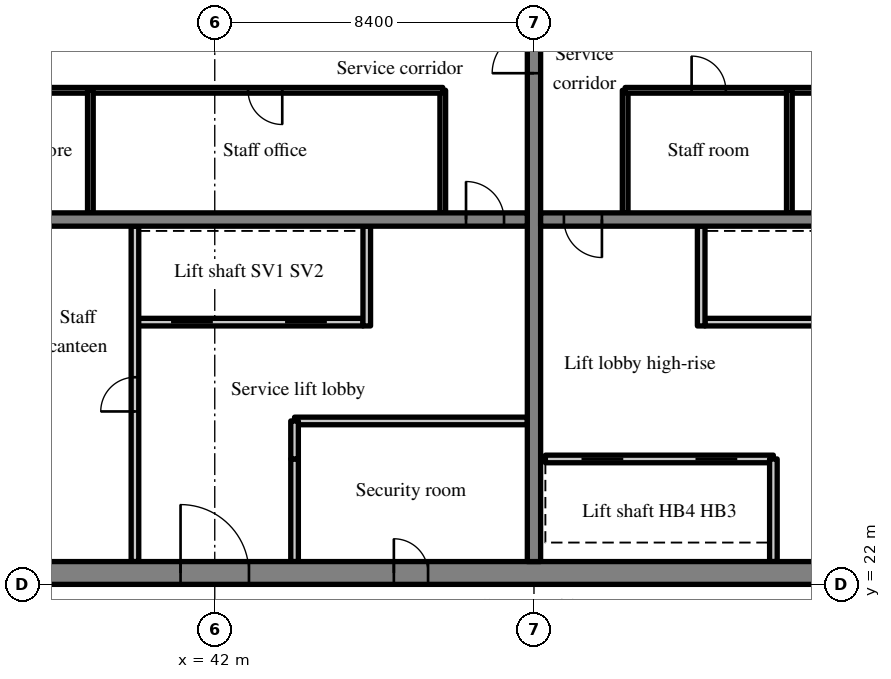
"""IFC4 building model, lengths in metres.
Left out: names, types, materials, properties, quantities, classifications, styles, units other than length and angle.
Written with IfcOpenShell. Run it as: python <this file> out.ifc"""

import sys

from ifc_helpers import new_model, si_unit, direction, frame, frame_2d, origin, place, context, subcontext, project, spatial, rectangle, extrude, source, transform, mapped, element, fill, save


model = new_model("IFC4")
c1 = context("Model", 3, precision=1e-05, world=origin(), true_north=direction((0.0, 1.0)))
c2 = subcontext(c1, "Body", "Model", "MODEL_VIEW")
j1 = project(units=[si_unit("LENGTHUNIT", "METRE"), si_unit("PLANEANGLEUNIT", "RADIAN")], contexts=[c1])
p1 = place(None, origin())
s1 = spatial("IfcSite", under=j1, at=p1, CompositionType="ELEMENT")
p2 = place(p1, origin())
s2 = spatial("IfcBuilding", under=s1, at=p2, CompositionType="ELEMENT")
p3 = place(p2, frame((0.0, 0.0, 217.9)))
s3 = spatial("IfcBuildingStorey", under=s2, at=p3, CompositionType="ELEMENT", Elevation=217.9)
m1 = source(origin(), c2, "Body", "SweptSolid", [
    extrude(rectangle(XDim=50.4, YDim=0.6, at=frame_2d((25.2, 0.0))), origin(), (0.0, 0.0, 1.0), 3.62),
])
p4 = place(p3, frame((25.2, 22.3, 0.0), z_axis=(0.0, 0.0, 1.0), x_axis=(1.0, 0.0, 0.0)))
e1 = element("IfcWall", 1, at=p4, inside=s3, PredefinedType="SHEAR", context=c2, shape_type="MappedRepresentation", body=[
    mapped(m1, transform((0.0, 0.0, 0.0), scale=1.0)),
])
m2 = source(origin(), c2, "Body", "SweptSolid", [
    extrude(rectangle(XDim=1.8, YDim=2.1, at=frame_2d((0.9, 1.05))), frame((0.0, 0.31, 0.0), z_axis=(0.0, -1.0, 0.0), x_axis=(1.0, 0.0, 0.0)), (0.0, 0.0, 1.0), 0.62),
])
p5 = place(p4, frame((15.9, 0.0, 0.0)))
e2 = element("IfcOpeningElement", 2, at=p5, cuts=e1, PredefinedType="OPENING", context=c2, shape_type="MappedRepresentation", body=[
    mapped(m2, transform((0.0, 0.0, 0.0), scale=1.0)),
])
m3 = source(origin(), c2, "Body", "SweptSolid", [
    extrude(rectangle(XDim=0.9, YDim=2.1, at=frame_2d((0.45, 1.05))), frame((0.0, 0.31, 0.0), z_axis=(0.0, -1.0, 0.0), x_axis=(1.0, 0.0, 0.0)), (0.0, 0.0, 1.0), 0.62),
])
p6 = place(p4, frame((9.687, 0.0, 0.0)))
e3 = element("IfcOpeningElement", 3, at=p6, cuts=e1, PredefinedType="OPENING", context=c2, shape_type="MappedRepresentation", body=[
    mapped(m3, transform((0.0, 0.0, 0.0), scale=1.0)),
])
p7 = place(p4, frame((21.513, 0.0, 0.0)))
e4 = element("IfcOpeningElement", 4, at=p7, cuts=e1, PredefinedType="OPENING", context=c2, shape_type="MappedRepresentation", body=[
    mapped(m3, transform((0.0, 0.0, 0.0), scale=1.0)),
])
p8 = place(p4, frame((32.7, 0.0, 0.0)))
e5 = element("IfcOpeningElement", 5, at=p8, cuts=e1, PredefinedType="OPENING", context=c2, shape_type="MappedRepresentation", body=[
    mapped(m2, transform((0.0, 0.0, 0.0), scale=1.0)),
])
m4 = source(origin(), c2, "Body", "SweptSolid", [
    extrude(rectangle(XDim=1.2, YDim=2.1, at=frame_2d((0.6, 1.05))), frame((0.0, 0.31, 0.0), z_axis=(0.0, -1.0, 0.0), x_axis=(1.0, 0.0, 0.0)), (0.0, 0.0, 1.0), 0.62),
])
p9 = place(p4, frame((6.488, 0.0, 0.0)))
e6 = element("IfcOpeningElement", 6, at=p9, cuts=e1, PredefinedType="OPENING", context=c2, shape_type="MappedRepresentation", body=[
    mapped(m4, transform((0.0, 0.0, 0.0), scale=1.0)),
])
p10 = place(p4, frame((47.925, 0.0, 0.0)))
e7 = element("IfcOpeningElement", 7, at=p10, cuts=e1, PredefinedType="OPENING", context=c2, shape_type="MappedRepresentation", body=[
    mapped(m4, transform((0.0, 0.0, 0.0), scale=1.0)),
])
m5 = source(origin(), c2, "Body", "SweptSolid", [
    extrude(rectangle(XDim=18.8, YDim=0.35, at=frame_2d((9.4, 0.0))), origin(), (0.0, 0.0, 1.0), 3.62),
])
p11 = place(p3, frame((50.4, 22.6, 0.0), z_axis=(0.0, 0.0, 1.0), x_axis=(0.0, 1.0, 0.0)))
e8 = element("IfcWall", 8, at=p11, inside=s3, PredefinedType="SHEAR", context=c2, shape_type="MappedRepresentation", body=[
    mapped(m5, transform((0.0, 0.0, 0.0), scale=1.0)),
])
m6 = source(origin(), c2, "Body", "SweptSolid", [
    extrude(rectangle(XDim=1.1, YDim=2.1, at=frame_2d((0.55, 1.05))), frame((0.0, 0.185, 0.0), z_axis=(0.0, -1.0, 0.0), x_axis=(1.0, 0.0, 0.0)), (0.0, 0.0, 1.0), 0.37),
])
p12 = place(p11, frame((12.85, 0.0, 0.0)))
e9 = element("IfcOpeningElement", 9, at=p12, cuts=e8, PredefinedType="OPENING", context=c2, shape_type="MappedRepresentation", body=[
    mapped(m6, transform((0.0, 0.0, 0.0), scale=1.0)),
])
m7 = source(origin(), c2, "Body", "SweptSolid", [
    extrude(rectangle(XDim=16.45, YDim=0.35, at=frame_2d((8.225, 0.0))), origin(), (0.0, 0.0, 1.0), 3.62),
])
p13 = place(p3, frame((33.775, 31.6, 0.0), z_axis=(0.0, 0.0, 1.0), x_axis=(1.0, 0.0, 0.0)))
e10 = element("IfcWall", 10, at=p13, inside=s3, PredefinedType="SHEAR", context=c2, shape_type="MappedRepresentation", body=[
    mapped(m7, transform((0.0, 0.0, 0.0), scale=1.0)),
])
m8 = source(origin(), c2, "Body", "SweptSolid", [
    extrude(rectangle(XDim=1.0, YDim=2.1, at=frame_2d((0.5, 1.05))), frame((0.0, 0.185, 0.0), z_axis=(0.0, -1.0, 0.0), x_axis=(1.0, 0.0, 0.0)), (0.0, 0.0, 1.0), 0.37),
])
p14 = place(p13, frame((14.837, 0.0, 0.0)))
e11 = element("IfcOpeningElement", 11, at=p14, cuts=e10, PredefinedType="OPENING", context=c2, shape_type="MappedRepresentation", body=[
    mapped(m8, transform((0.0, 0.0, 0.0), scale=1.0)),
])
m9 = source(origin(), c2, "Body", "SweptSolid", [
    extrude(rectangle(XDim=16.45, YDim=0.35, at=frame_2d((8.225, 0.0))), origin(), (0.0, 0.0, 1.0), 3.62),
])
p15 = place(p3, frame((50.575, 31.6, 0.0), z_axis=(0.0, 0.0, 1.0), x_axis=(1.0, 0.0, 0.0)))
e12 = element("IfcWall", 12, at=p15, inside=s3, PredefinedType="SHEAR", context=c2, shape_type="MappedRepresentation", body=[
    mapped(m9, transform((0.0, 0.0, 0.0), scale=1.0)),
])
p16 = place(p15, frame((0.613, 0.0, 0.0)))
e13 = element("IfcOpeningElement", 13, at=p16, cuts=e12, PredefinedType="OPENING", context=c2, shape_type="MappedRepresentation", body=[
    mapped(m8, transform((0.0, 0.0, 0.0), scale=1.0)),
])
m10 = source(origin(), c2, "Body", "SweptSolid", [
    extrude(rectangle(XDim=6.0, YDim=0.2, at=frame_2d((3.0, 0.0))), origin(), (0.0, 0.0, 1.0), 3.62),
])
p17 = place(p3, frame((39.9, 28.9, 0.0), z_axis=(0.0, 0.0, 1.0), x_axis=(1.0, 0.0, 0.0)))
e14 = element("IfcWall", 14, at=p17, inside=s3, PredefinedType="SOLIDWALL", context=c2, shape_type="MappedRepresentation", body=[
    mapped(m10, transform((0.0, 0.0, 0.0), scale=1.0)),
])
m11 = source(origin(), c2, "Body", "SweptSolid", [
    extrude(rectangle(XDim=1.1, YDim=2.1, at=frame_2d((0.55, 1.05))), frame((0.0, 0.11, 0.0), z_axis=(0.0, -1.0, 0.0), x_axis=(1.0, 0.0, 0.0)), (0.0, 0.0, 1.0), 0.22),
])
p18 = place(p17, frame((0.95, 0.0, 0.0)))
e15 = element("IfcOpeningElement", 15, at=p18, cuts=e14, PredefinedType="OPENING", context=c2, shape_type="MappedRepresentation", body=[
    mapped(m11, transform((0.0, 0.0, 0.0), scale=1.0)),
])
p19 = place(p17, frame((3.95, 0.0, 0.0)))
e16 = element("IfcOpeningElement", 16, at=p19, cuts=e14, PredefinedType="OPENING", context=c2, shape_type="MappedRepresentation", body=[
    mapped(m11, transform((0.0, 0.0, 0.0), scale=1.0)),
])
m12 = source(origin(), c2, "Body", "SweptSolid", [
    extrude(rectangle(XDim=8.825, YDim=0.2, at=frame_2d((4.413, 0.0))), origin(), (0.0, 0.0, 1.0), 3.62),
])
p20 = place(p3, frame((39.9, 22.6, 0.0), z_axis=(0.0, 0.0, 1.0), x_axis=(0.0, 1.0, 0.0)))
e17 = element("IfcWall", 17, at=p20, inside=s3, PredefinedType="PARTITIONING", context=c2, shape_type="MappedRepresentation", body=[
    mapped(m12, transform((0.0, 0.0, 0.0), scale=1.0)),
])
m13 = source(origin(), c2, "Body", "SweptSolid", [
    extrude(rectangle(XDim=0.9, YDim=2.1, at=frame_2d((0.45, 1.05))), frame((0.0, 0.11, 0.0), z_axis=(0.0, -1.0, 0.0), x_axis=(1.0, 0.0, 0.0)), (0.0, 0.0, 1.0), 0.22),
])
p21 = place(p20, frame((3.95, 0.0, 0.0)))
e18 = element("IfcOpeningElement", 18, at=p21, cuts=e17, PredefinedType="OPENING", context=c2, shape_type="MappedRepresentation", body=[
    mapped(m13, transform((0.0, 0.0, 0.0), scale=1.0)),
])
m14 = source(origin(), c2, "Body", "SweptSolid", [
    extrude(rectangle(XDim=2.7, YDim=0.2, at=frame_2d((1.35, 0.0))), origin(), (0.0, 0.0, 1.0), 3.62),
])
p22 = place(p3, frame((44.1, 22.6, 0.0), z_axis=(0.0, 0.0, 1.0), x_axis=(0.0, 1.0, 0.0)))
e19 = element("IfcWall", 19, at=p22, inside=s3, PredefinedType="PARTITIONING", context=c2, shape_type="MappedRepresentation", body=[
    mapped(m14, transform((0.0, 0.0, 0.0), scale=1.0)),
])
m15 = source(origin(), c2, "Body", "SweptSolid", [
    extrude(rectangle(XDim=2.625, YDim=0.2, at=frame_2d((1.312, 0.0))), origin(), (0.0, 0.0, 1.0), 3.62),
])
p23 = place(p3, frame((46.0, 28.8, 0.0), z_axis=(0.0, 0.0, 1.0), x_axis=(0.0, 1.0, 0.0)))
e20 = element("IfcWall", 20, at=p23, inside=s3, PredefinedType="SOLIDWALL", context=c2, shape_type="MappedRepresentation", body=[
    mapped(m15, transform((0.0, 0.0, 0.0), scale=1.0)),
])
m16 = source(origin(), c2, "Body", "SweptSolid", [
    extrude(rectangle(XDim=6.125, YDim=0.2, at=frame_2d((3.062, 0.0))), origin(), (0.0, 0.0, 1.0), 3.62),
])
p24 = place(p3, frame((44.1, 26.3, 0.0), z_axis=(0.0, 0.0, 1.0), x_axis=(1.0, 0.0, 0.0)))
e21 = element("IfcWall", 21, at=p24, inside=s3, PredefinedType="PARTITIONING", context=c2, shape_type="MappedRepresentation", body=[
    mapped(m16, transform((0.0, 0.0, 0.0), scale=1.0)),
])
m17 = source(origin(), c2, "Body", "SweptSolid", [
    extrude(rectangle(XDim=1.0, YDim=0.2, at=frame_2d((0.5, 0.0))), origin(), (0.0, 0.0, 1.0), 3.62),
])
p25 = place(p3, frame((44.1, 25.3, 0.0), z_axis=(0.0, 0.0, 1.0), x_axis=(0.0, 1.0, 0.0)))
e22 = element("IfcWall", 22, at=p25, inside=s3, PredefinedType="PARTITIONING", context=c2, shape_type="MappedRepresentation", body=[
    mapped(m17, transform((0.0, 0.0, 0.0), scale=1.0)),
])
m18 = source(origin(), c2, "Body", "SweptSolid", [
    extrude(rectangle(XDim=3.225, YDim=0.15, at=frame_2d((1.613, 0.0))), origin(), (0.0, 0.0, 1.0), 3.62),
])
p26 = place(p3, frame((48.0, 31.775, 0.0), z_axis=(0.0, 0.0, 1.0), x_axis=(0.0, 1.0, 0.0)))
e23 = element("IfcWall", 23, at=p26, inside=s3, PredefinedType="PARTITIONING", context=c2, shape_type="MappedRepresentation", body=[
    mapped(m18, transform((0.0, 0.0, 0.0), scale=1.0)),
])
m19 = source(origin(), c2, "Body", "SweptSolid", [
    extrude(rectangle(XDim=14.225, YDim=0.15, at=frame_2d((7.113, 0.0))), origin(), (0.0, 0.0, 1.0), 3.62),
])
p27 = place(p3, frame((33.775, 35.0, 0.0), z_axis=(0.0, 0.0, 1.0), x_axis=(1.0, 0.0, 0.0)))
e24 = element("IfcWall", 24, at=p27, inside=s3, PredefinedType="PARTITIONING", context=c2, shape_type="MappedRepresentation", body=[
    mapped(m19, transform((0.0, 0.0, 0.0), scale=1.0)),
])
m20 = source(origin(), c2, "Body", "SweptSolid", [
    extrude(rectangle(XDim=0.9, YDim=2.1, at=frame_2d((0.45, 1.05))), frame((0.0, 0.085, 0.0), z_axis=(0.0, -1.0, 0.0), x_axis=(1.0, 0.0, 0.0)), (0.0, 0.0, 1.0), 0.17),
])
p28 = place(p27, frame((2.026, 0.0, 0.0)))
e25 = element("IfcOpeningElement", 25, at=p28, cuts=e24, PredefinedType="OPENING", context=c2, shape_type="MappedRepresentation", body=[
    mapped(m20, transform((0.0, 0.0, 0.0), scale=1.0)),
])
p29 = place(p27, frame((9.101, 0.0, 0.0)))
e26 = element("IfcOpeningElement", 26, at=p29, cuts=e24, PredefinedType="OPENING", context=c2, shape_type="MappedRepresentation", body=[
    mapped(m20, transform((0.0, 0.0, 0.0), scale=1.0)),
])
p30 = place(p3, frame((38.727, 31.775, 0.0), z_axis=(0.0, 0.0, 1.0), x_axis=(0.0, 1.0, 0.0)))
e27 = element("IfcWall", 27, at=p30, inside=s3, PredefinedType="PARTITIONING", context=c2, shape_type="MappedRepresentation", body=[
    mapped(m18, transform((0.0, 0.0, 0.0), scale=1.0)),
])
p31 = place(p3, frame((56.7, 25.3, 0.0), z_axis=(0.0, 0.0, 1.0), x_axis=(-1.0, 0.0, 0.0)))
e28 = element("IfcWall", 28, at=p31, inside=s3, PredefinedType="SOLIDWALL", context=c2, shape_type="MappedRepresentation", body=[
    mapped(m10, transform((0.0, 0.0, 0.0), scale=1.0)),
])
p32 = place(p31, frame((0.95, 0.0, 0.0)))
e29 = element("IfcOpeningElement", 29, at=p32, cuts=e28, PredefinedType="OPENING", context=c2, shape_type="MappedRepresentation", body=[
    mapped(m11, transform((0.0, 0.0, 0.0), scale=1.0)),
])
p33 = place(p31, frame((3.95, 0.0, 0.0)))
e30 = element("IfcOpeningElement", 30, at=p33, cuts=e28, PredefinedType="OPENING", context=c2, shape_type="MappedRepresentation", body=[
    mapped(m11, transform((0.0, 0.0, 0.0), scale=1.0)),
])
m21 = source(origin(), c2, "Body", "SweptSolid", [
    extrude(rectangle(XDim=12.125, YDim=0.2, at=frame_2d((6.062, 0.0))), origin(), (0.0, 0.0, 1.0), 3.62),
])
p34 = place(p3, frame((67.025, 28.9, 0.0), z_axis=(0.0, 0.0, 1.0), x_axis=(-1.0, 0.0, 0.0)))
e31 = element("IfcWall", 31, at=p34, inside=s3, PredefinedType="SOLIDWALL", context=c2, shape_type="MappedRepresentation", body=[
    mapped(m21, transform((0.0, 0.0, 0.0), scale=1.0)),
])
p35 = place(p34, frame((1.075, 0.0, 0.0)))
e32 = element("IfcOpeningElement", 32, at=p35, cuts=e31, PredefinedType="OPENING", context=c2, shape_type="MappedRepresentation", body=[
    mapped(m11, transform((0.0, 0.0, 0.0), scale=1.0)),
])
p36 = place(p34, frame((4.075, 0.0, 0.0)))
e33 = element("IfcOpeningElement", 33, at=p36, cuts=e31, PredefinedType="OPENING", context=c2, shape_type="MappedRepresentation", body=[
    mapped(m11, transform((0.0, 0.0, 0.0), scale=1.0)),
])
p37 = place(p3, frame((56.7, 22.6, 0.0), z_axis=(0.0, 0.0, 1.0), x_axis=(0.0, 1.0, 0.0)))
e34 = element("IfcWall", 34, at=p37, inside=s3, PredefinedType="SOLIDWALL", context=c2, shape_type="MappedRepresentation", body=[
    mapped(m14, transform((0.0, 0.0, 0.0), scale=1.0)),
])
p38 = place(p3, frame((54.8, 28.8, 0.0), z_axis=(0.0, 0.0, 1.0), x_axis=(0.0, 1.0, 0.0)))
e35 = element("IfcWall", 35, at=p38, inside=s3, PredefinedType="SOLIDWALL", context=c2, shape_type="MappedRepresentation", body=[
    mapped(m15, transform((0.0, 0.0, 0.0), scale=1.0)),
])
p39 = place(p3, frame((52.8, 31.775, 0.0), z_axis=(0.0, 0.0, 1.0), x_axis=(0.0, 1.0, 0.0)))
e36 = element("IfcWall", 36, at=p39, inside=s3, PredefinedType="PARTITIONING", context=c2, shape_type="MappedRepresentation", body=[
    mapped(m18, transform((0.0, 0.0, 0.0), scale=1.0)),
])
m22 = source(origin(), c2, "Body", "SweptSolid", [
    extrude(rectangle(XDim=14.225, YDim=0.15, at=frame_2d((7.112, 0.0))), origin(), (0.0, 0.0, 1.0), 3.62),
])
p40 = place(p3, frame((67.025, 35.0, 0.0), z_axis=(0.0, 0.0, 1.0), x_axis=(-1.0, 0.0, 0.0)))
e37 = element("IfcWall", 37, at=p40, inside=s3, PredefinedType="PARTITIONING", context=c2, shape_type="MappedRepresentation", body=[
    mapped(m22, transform((0.0, 0.0, 0.0), scale=1.0)),
])
p41 = place(p40, frame((0.965, 0.0, 0.0)))
e38 = element("IfcOpeningElement", 38, at=p41, cuts=e37, PredefinedType="OPENING", context=c2, shape_type="MappedRepresentation", body=[
    mapped(m20, transform((0.0, 0.0, 0.0), scale=1.0)),
])
p42 = place(p40, frame((5.918, 0.0, 0.0)))
e39 = element("IfcOpeningElement", 39, at=p42, cuts=e37, PredefinedType="OPENING", context=c2, shape_type="MappedRepresentation", body=[
    mapped(m20, transform((0.0, 0.0, 0.0), scale=1.0)),
])
p43 = place(p40, frame((11.577, 0.0, 0.0)))
e40 = element("IfcOpeningElement", 40, at=p43, cuts=e37, PredefinedType="OPENING", context=c2, shape_type="MappedRepresentation", body=[
    mapped(m20, transform((0.0, 0.0, 0.0), scale=1.0)),
])
p44 = place(p3, frame((57.12, 31.775, 0.0), z_axis=(0.0, 0.0, 1.0), x_axis=(0.0, 1.0, 0.0)))
e41 = element("IfcWall", 41, at=p44, inside=s3, PredefinedType="PARTITIONING", context=c2, shape_type="MappedRepresentation", body=[
    mapped(m18, transform((0.0, 0.0, 0.0), scale=1.0)),
])
m23 = source(origin(), c2, "Body", "SweptSolid", [
    extrude(rectangle(XDim=1.8, YDim=2.1, at=frame_2d((0.9, 1.05))), frame((0.0, 0.225, 0.0), z_axis=(0.0, -1.0, 0.0), x_axis=(1.0, 0.0, 0.0)), (0.0, 0.0, 1.0), 0.05),
])
p45 = place(p5, origin())
e42 = element("IfcDoor", 42, at=p45, inside=s3, OperationType="DOUBLE_DOOR_SINGLE_SWING", PredefinedType="DOOR", context=c2, shape_type="MappedRepresentation", body=[
    mapped(m23, transform((0.0, 0.0, 0.0), scale=1.0)),
])
fill(e2, e42)
m24 = source(origin(), c2, "Body", "SweptSolid", [
    extrude(rectangle(XDim=1.0, YDim=2.1, at=frame_2d((0.5, 1.05))), frame((0.0, 0.025, 0.0), z_axis=(0.0, -1.0, 0.0), x_axis=(1.0, 0.0, 0.0)), (0.0, 0.0, 1.0), 0.05),
])
p46 = place(p14, origin())
e43 = element("IfcDoor", 43, at=p46, inside=s3, OperationType="SINGLE_SWING_LEFT", PredefinedType="DOOR", context=c2, shape_type="MappedRepresentation", body=[
    mapped(m24, transform((0.0, 0.0, 0.0), scale=1.0)),
])
fill(e11, e43)
m25 = source(origin(), c2, "Body", "SweptSolid", [
    extrude(rectangle(XDim=1.1, YDim=2.1, at=frame_2d((0.55, 1.05))), frame((0.0, 0.025, 0.0), z_axis=(0.0, -1.0, 0.0), x_axis=(1.0, 0.0, 0.0)), (0.0, 0.0, 1.0), 0.05),
])
p47 = place(p18, origin())
e44 = element("IfcDoor", 44, at=p47, inside=s3, OperationType="SLIDING_TO_LEFT", PredefinedType="DOOR", context=c2, shape_type="MappedRepresentation", body=[
    mapped(m25, transform((0.0, 0.0, 0.0), scale=1.0)),
])
fill(e15, e44)
p48 = place(p19, origin())
e45 = element("IfcDoor", 45, at=p48, inside=s3, OperationType="SLIDING_TO_RIGHT", PredefinedType="DOOR", context=c2, shape_type="MappedRepresentation", body=[
    mapped(m25, transform((0.0, 0.0, 0.0), scale=1.0)),
])
fill(e16, e45)
m26 = source(origin(), c2, "Body", "SweptSolid", [
    extrude(rectangle(XDim=0.9, YDim=2.1, at=frame_2d((0.45, 1.05))), frame((0.0, 0.025, 0.0), z_axis=(0.0, -1.0, 0.0), x_axis=(1.0, 0.0, 0.0)), (0.0, 0.0, 1.0), 0.05),
])
p49 = place(p21, origin())
e46 = element("IfcDoor", 46, at=p49, inside=s3, OperationType="SINGLE_SWING_LEFT", PredefinedType="DOOR", context=c2, shape_type="MappedRepresentation", body=[
    mapped(m26, transform((0.0, 0.0, 0.0), scale=1.0)),
])
fill(e18, e46)
m27 = source(origin(), c2, "Body", "SweptSolid", [
    extrude(rectangle(XDim=0.9, YDim=2.1, at=frame_2d((0.45, 1.05))), frame((0.0, 0.225, 0.0), z_axis=(0.0, -1.0, 0.0), x_axis=(1.0, 0.0, 0.0)), (0.0, 0.0, 1.0), 0.05),
])
p50 = place(p7, origin())
e47 = element("IfcDoor", 47, at=p50, inside=s3, OperationType="SINGLE_SWING_LEFT", PredefinedType="DOOR", context=c2, shape_type="MappedRepresentation", body=[
    mapped(m27, transform((0.0, 0.0, 0.0), scale=1.0)),
])
fill(e4, e47)
p51 = place(p29, origin())
e48 = element("IfcDoor", 48, at=p51, inside=s3, OperationType="SINGLE_SWING_RIGHT", PredefinedType="DOOR", context=c2, shape_type="MappedRepresentation", body=[
    mapped(m26, transform((0.0, 0.0, 0.0), scale=1.0)),
])
fill(e26, e48)
p52 = place(p16, origin())
e49 = element("IfcDoor", 49, at=p52, inside=s3, OperationType="SINGLE_SWING_RIGHT", PredefinedType="DOOR", context=c2, shape_type="MappedRepresentation", body=[
    mapped(m24, transform((0.0, 0.0, 0.0), scale=1.0)),
])
fill(e13, e49)
p53 = place(p32, origin())
e50 = element("IfcDoor", 50, at=p53, inside=s3, OperationType="SLIDING_TO_RIGHT", PredefinedType="DOOR", context=c2, shape_type="MappedRepresentation", body=[
    mapped(m25, transform((0.0, 0.0, 0.0), scale=1.0)),
])
fill(e29, e50)
p54 = place(p33, origin())
e51 = element("IfcDoor", 51, at=p54, inside=s3, OperationType="SLIDING_TO_LEFT", PredefinedType="DOOR", context=c2, shape_type="MappedRepresentation", body=[
    mapped(m25, transform((0.0, 0.0, 0.0), scale=1.0)),
])
fill(e30, e51)
p55 = place(p43, origin())
e52 = element("IfcDoor", 52, at=p55, inside=s3, OperationType="SINGLE_SWING_RIGHT", PredefinedType="DOOR", context=c2, shape_type="MappedRepresentation", body=[
    mapped(m26, transform((0.0, 0.0, 0.0), scale=1.0)),
])
fill(e40, e52)
p56 = place(p12, origin())
e53 = element("IfcDoor", 53, at=p56, inside=s3, OperationType="SINGLE_SWING_LEFT", PredefinedType="DOOR", context=c2, shape_type="MappedRepresentation", body=[
    mapped(m25, transform((0.0, 0.0, 0.0), scale=1.0)),
])
fill(e9, e53)
save(model, sys.argv[1])
